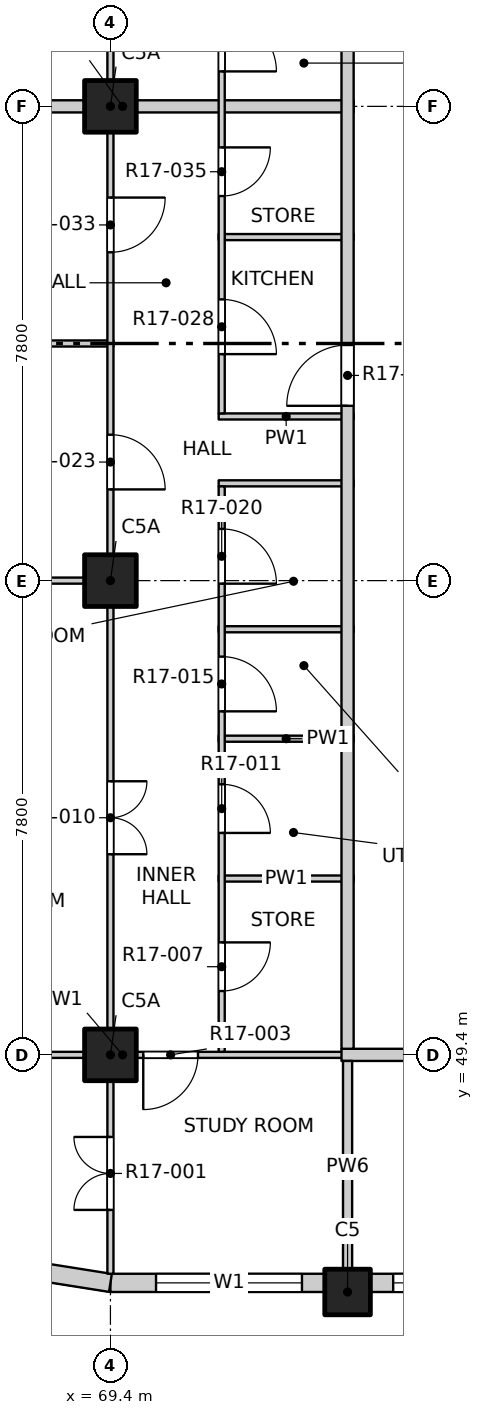
"""IFC4 building model, lengths in metres.
Left out: names, types, materials, properties, quantities, classifications, styles, units other than length and angle.
Written with IfcOpenShell. Run it as: python <this file> out.ifc"""

import sys

from ifc_helpers import new_model, si_unit, direction, frame, frame_2d, origin, origin_2d, place, context, subcontext, project, spatial, rectangle, extrude, element, fill, save


model = new_model("IFC4")
c1 = context("Model", 3, precision=1e-05, world=origin(), true_north=direction((0.0, 1.0)))
c2 = subcontext(c1, "Body", "Model", "MODEL_VIEW")
j1 = project(units=[si_unit("LENGTHUNIT", "METRE"), si_unit("PLANEANGLEUNIT", "RADIAN")], contexts=[c1])
p1 = place(None, origin())
s1 = spatial("IfcSite", under=j1, at=p1, CompositionType="ELEMENT")
p2 = place(p1, origin())
s2 = spatial("IfcBuilding", under=s1, at=p2, CompositionType="ELEMENT")
p3 = place(p2, frame((0.0, 0.0, 182.6)))
s3 = spatial("IfcBuildingStorey", under=s2, at=p3, CompositionType="ELEMENT", Elevation=182.6)
p4 = place(p3, frame((73.3, 45.5, -0.25), z_axis=(0.0, 0.0, 1.0), x_axis=(1.0, 0.0, 0.0)))
e1 = element("IfcColumn", 1, at=p4, inside=s3, PredefinedType="COLUMN", context=c2, shape_type="SweptSolid", body=[
    extrude(rectangle(XDim=0.75, YDim=0.75, at=origin_2d()), origin(), (0.0, 0.0, 1.0), 3.4),
])
for number, where, z_axis, x_axis in (
    (2, (69.4, 49.4, -0.25), (0.0, 0.0, 1.0), (1.0, 0.0, 0.0)),
    (3, (69.4, 57.2, -0.25), (0.0, 0.0, 1.0), (1.0, 0.0, 0.0)),
    (4, (69.4, 65.0, -0.25), (0.0, 0.0, 1.0), (1.0, 0.0, 0.0)),
):
    element("IfcColumn", number, at=place(p3, frame(where, z_axis=z_axis, x_axis=x_axis)), inside=s3, PredefinedType="COLUMN", context=c2, shape_type="SweptSolid", body=[
        extrude(rectangle(XDim=0.85, YDim=0.85, at=origin_2d()), origin(), (0.0, 0.0, 1.0), 3.4),
    ])
p5 = place(p3, frame((69.4, 45.65, 0.0), z_axis=(0.0, 0.0, 1.0), x_axis=(1.0, 0.0, 0.0)))
e5 = element("IfcWall", 5, at=p5, inside=s3, PredefinedType="SOLIDWALL", context=c2, shape_type="SweptSolid", body=[
    extrude(rectangle(XDim=3.525, YDim=0.3, at=frame_2d((1.763, 0.0))), origin(), (0.0, 0.0, 1.0), 2.7),
])
p6 = place(p5, frame((0.75, 0.0, 0.9)))
e6 = element("IfcOpeningElement", 6, at=p6, cuts=e5, PredefinedType="OPENING", context=c2, shape_type="SweptSolid", body=[
    extrude(rectangle(XDim=2.4, YDim=1.8, at=frame_2d((1.2, 0.9))), frame((0.0, 0.16, 0.0), z_axis=(0.0, -1.0, 0.0), x_axis=(1.0, 0.0, 0.0)), (0.0, 0.0, 1.0), 0.32),
])
p7 = place(p3, frame((73.675, 45.65, 0.0), z_axis=(0.0, 0.0, 1.0), x_axis=(1.0, 0.0, 0.0)))
e7 = element("IfcWall", 7, at=p7, inside=s3, PredefinedType="SOLIDWALL", context=c2, shape_type="SweptSolid", body=[
    extrude(rectangle(XDim=7.05, YDim=0.3, at=frame_2d((3.525, 0.0))), origin(), (0.0, 0.0, 1.0), 2.7),
])
p8 = place(p7, frame((0.375, 0.0, 0.9)))
e8 = element("IfcOpeningElement", 8, at=p8, cuts=e7, PredefinedType="OPENING", context=c2, shape_type="SweptSolid", body=[
    extrude(rectangle(XDim=2.4, YDim=1.8, at=frame_2d((1.2, 0.9))), frame((0.0, 0.16, 0.0), z_axis=(0.0, -1.0, 0.0), x_axis=(1.0, 0.0, 0.0)), (0.0, 0.0, 1.0), 0.32),
])
p9 = place(p7, frame((4.275, 0.0, 0.9)))
e9 = element("IfcOpeningElement", 9, at=p9, cuts=e7, PredefinedType="OPENING", context=c2, shape_type="SweptSolid", body=[
    extrude(rectangle(XDim=2.4, YDim=1.8, at=frame_2d((1.2, 0.9))), frame((0.0, 0.16, 0.0), z_axis=(0.0, -1.0, 0.0), x_axis=(1.0, 0.0, 0.0)), (0.0, 0.0, 1.0), 0.32),
])
p10 = place(p3, frame((68.241, 45.833, 0.0), z_axis=(0.0, 0.0, 1.0), x_axis=(0.987678452879, -0.156496880861, 0.0)))
e10 = element("IfcWall", 10, at=p10, inside=s3, PredefinedType="SOLIDWALL", context=c2, shape_type="SweptSolid", body=[
    extrude(rectangle(XDim=1.173, YDim=0.3, at=frame_2d((0.586, 0.0))), origin(), (0.0, 0.0, 1.0), 2.7),
])
p11 = place(p3, frame((65.8, 49.4, 0.0), z_axis=(0.0, 0.0, 1.0), x_axis=(1.0, 0.0, 0.0)))
e11 = element("IfcWall", 11, at=p11, inside=s3, PredefinedType="PARTITIONING", context=c2, shape_type="SweptSolid", body=[
    extrude(rectangle(XDim=7.6, YDim=0.1, at=frame_2d((3.8, 0.0))), origin(), (0.0, 0.0, 1.0), 3.15),
])
p12 = place(p11, frame((4.14, 0.0, 0.0)))
e12 = element("IfcOpeningElement", 12, at=p12, cuts=e11, PredefinedType="OPENING", context=c2, shape_type="SweptSolid", body=[
    extrude(rectangle(XDim=0.9, YDim=2.1, at=frame_2d((0.45, 1.05))), frame((0.0, 0.06, 0.0), z_axis=(0.0, -1.0, 0.0), x_axis=(1.0, 0.0, 0.0)), (0.0, 0.0, 1.0), 0.12),
])
p13 = place(p3, frame((73.2, 49.4, 0.0), z_axis=(0.0, 0.0, 1.0), x_axis=(1.0, 0.0, 0.0)))
e13 = element("IfcWall", 13, at=p13, inside=s3, PredefinedType="PARTITIONING", context=c2, shape_type="SweptSolid", body=[
    extrude(rectangle(XDim=23.6, YDim=0.2, at=frame_2d((11.8, 0.0))), origin(), (0.0, 0.0, 1.0), 3.15),
])
p14 = place(p13, frame((7.3, 0.0, 0.0)))
e14 = element("IfcOpeningElement", 14, at=p14, cuts=e13, PredefinedType="OPENING", context=c2, shape_type="SweptSolid", body=[
    extrude(rectangle(XDim=1.2, YDim=2.1, at=frame_2d((0.6, 1.05))), frame((0.0, 0.11, 0.0), z_axis=(0.0, -1.0, 0.0), x_axis=(1.0, 0.0, 0.0)), (0.0, 0.0, 1.0), 0.22),
])
p15 = place(p13, frame((20.125, 0.0, 0.0)))
e15 = element("IfcOpeningElement", 15, at=p15, cuts=e13, PredefinedType="OPENING", context=c2, shape_type="SweptSolid", body=[
    extrude(rectangle(XDim=1.2, YDim=2.1, at=frame_2d((0.6, 1.05))), frame((0.0, 0.11, 0.0), z_axis=(0.0, -1.0, 0.0), x_axis=(1.0, 0.0, 0.0)), (0.0, 0.0, 1.0), 0.22),
])
for number, where, z_axis, x_axis in (
    (16, (71.18, 52.3, 0.0), (0.0, 0.0, 1.0), (1.0, 0.0, 0.0)),
    (17, (71.18, 54.6, 0.0), (0.0, 0.0, 1.0), (1.0, 0.0, 0.0)),
    (18, (71.18, 56.4, 0.0), (0.0, 0.0, 1.0), (1.0, 0.0, 0.0)),
):
    element("IfcWall", number, at=place(p3, frame(where, z_axis=z_axis, x_axis=x_axis)), inside=s3, PredefinedType="PARTITIONING", context=c2, shape_type="SweptSolid", body=[
        extrude(rectangle(XDim=2.22, YDim=0.1, at=frame_2d((1.11, 0.0))), origin(), (0.0, 0.0, 1.0), 3.15),
    ])
p16 = place(p3, frame((65.8, 57.2, 0.0), z_axis=(0.0, 0.0, 1.0), x_axis=(1.0, 0.0, 0.0)))
e19 = element("IfcWall", 19, at=p16, inside=s3, PredefinedType="PARTITIONING", context=c2, shape_type="SweptSolid", body=[
    extrude(rectangle(XDim=3.65, YDim=0.1, at=frame_2d((1.825, 0.0))), origin(), (0.0, 0.0, 1.0), 3.15),
])
for number, where, z_axis, x_axis in (
    (20, (71.18, 58.8, 0.0), (0.0, 0.0, 1.0), (1.0, 0.0, 0.0)),
    (21, (71.18, 59.9, 0.0), (0.0, 0.0, 1.0), (1.0, 0.0, 0.0)),
):
    element("IfcWall", number, at=place(p3, frame(where, z_axis=z_axis, x_axis=x_axis)), inside=s3, PredefinedType="PARTITIONING", context=c2, shape_type="SweptSolid", body=[
        extrude(rectangle(XDim=2.22, YDim=0.1, at=frame_2d((1.11, 0.0))), origin(), (0.0, 0.0, 1.0), 3.15),
    ])
p17 = place(p3, frame((65.8, 61.1, 0.0), z_axis=(0.0, 0.0, 1.0), x_axis=(1.0, 0.0, 0.0)))
e22 = element("IfcWall", 22, at=p17, inside=s3, PredefinedType="PARTITIONING", context=c2, shape_type="SweptSolid", body=[
    extrude(rectangle(XDim=3.65, YDim=0.1, at=frame_2d((1.825, 0.0))), origin(), (0.0, 0.0, 1.0), 2.55),
])
p18 = place(p3, frame((71.18, 62.85, 0.0), z_axis=(0.0, 0.0, 1.0), x_axis=(1.0, 0.0, 0.0)))
e23 = element("IfcWall", 23, at=p18, inside=s3, PredefinedType="PARTITIONING", context=c2, shape_type="SweptSolid", body=[
    extrude(rectangle(XDim=2.22, YDim=0.1, at=frame_2d((1.11, 0.0))), origin(), (0.0, 0.0, 1.0), 3.15),
])
p19 = place(p3, frame((65.8, 65.0, 0.0), z_axis=(0.0, 0.0, 1.0), x_axis=(1.0, 0.0, 0.0)))
e24 = element("IfcWall", 24, at=p19, inside=s3, PredefinedType="PARTITIONING", context=c2, shape_type="SweptSolid", body=[
    extrude(rectangle(XDim=7.6, YDim=0.2, at=frame_2d((3.8, 0.0))), origin(), (0.0, 0.0, 1.0), 3.15),
])
p20 = place(p3, frame((69.4, 45.8, 0.0), z_axis=(0.0, 0.0, 1.0), x_axis=(0.0, 1.0, 0.0)))
e25 = element("IfcWall", 25, at=p20, inside=s3, PredefinedType="PARTITIONING", context=c2, shape_type="SweptSolid", body=[
    extrude(rectangle(XDim=38.4, YDim=0.1, at=frame_2d((19.2, 0.0))), origin(), (0.0, 0.0, 1.0), 3.15),
])
p21 = place(p20, frame((1.05, 0.0, 0.0)))
e26 = element("IfcOpeningElement", 26, at=p21, cuts=e25, PredefinedType="OPENING", context=c2, shape_type="SweptSolid", body=[
    extrude(rectangle(XDim=1.2, YDim=2.1, at=frame_2d((0.6, 1.05))), frame((0.0, 0.06, 0.0), z_axis=(0.0, -1.0, 0.0), x_axis=(1.0, 0.0, 0.0)), (0.0, 0.0, 1.0), 0.12),
])
p22 = place(p20, frame((6.9, 0.0, 0.0)))
e27 = element("IfcOpeningElement", 27, at=p22, cuts=e25, PredefinedType="OPENING", context=c2, shape_type="SweptSolid", body=[
    extrude(rectangle(XDim=1.2, YDim=2.1, at=frame_2d((0.6, 1.05))), frame((0.0, 0.06, 0.0), z_axis=(0.0, -1.0, 0.0), x_axis=(1.0, 0.0, 0.0)), (0.0, 0.0, 1.0), 0.12),
])
p23 = place(p20, frame((12.9, 0.0, 0.0)))
e28 = element("IfcOpeningElement", 28, at=p23, cuts=e25, PredefinedType="OPENING", context=c2, shape_type="SweptSolid", body=[
    extrude(rectangle(XDim=0.9, YDim=2.1, at=frame_2d((0.45, 1.05))), frame((0.0, 0.06, 0.0), z_axis=(0.0, -1.0, 0.0), x_axis=(1.0, 0.0, 0.0)), (0.0, 0.0, 1.0), 0.12),
])
p24 = place(p20, frame((16.8, 0.0, 0.0)))
e29 = element("IfcOpeningElement", 29, at=p24, cuts=e25, PredefinedType="OPENING", context=c2, shape_type="SweptSolid", body=[
    extrude(rectangle(XDim=0.9, YDim=2.1, at=frame_2d((0.45, 1.05))), frame((0.0, 0.06, 0.0), z_axis=(0.0, -1.0, 0.0), x_axis=(1.0, 0.0, 0.0)), (0.0, 0.0, 1.0), 0.12),
])
p25 = place(p20, frame((20.7, 0.0, 0.0)))
e30 = element("IfcOpeningElement", 30, at=p25, cuts=e25, PredefinedType="OPENING", context=c2, shape_type="SweptSolid", body=[
    extrude(rectangle(XDim=0.9, YDim=2.1, at=frame_2d((0.45, 1.05))), frame((0.0, 0.06, 0.0), z_axis=(0.0, -1.0, 0.0), x_axis=(1.0, 0.0, 0.0)), (0.0, 0.0, 1.0), 0.12),
])
p26 = place(p20, frame((24.6, 0.0, 0.0)))
e31 = element("IfcOpeningElement", 31, at=p26, cuts=e25, PredefinedType="OPENING", context=c2, shape_type="SweptSolid", body=[
    extrude(rectangle(XDim=0.9, YDim=2.1, at=frame_2d((0.45, 1.05))), frame((0.0, 0.06, 0.0), z_axis=(0.0, -1.0, 0.0), x_axis=(1.0, 0.0, 0.0)), (0.0, 0.0, 1.0), 0.12),
])
p27 = place(p20, frame((28.5, 0.0, 0.0)))
e32 = element("IfcOpeningElement", 32, at=p27, cuts=e25, PredefinedType="OPENING", context=c2, shape_type="SweptSolid", body=[
    extrude(rectangle(XDim=0.9, YDim=2.1, at=frame_2d((0.45, 1.05))), frame((0.0, 0.06, 0.0), z_axis=(0.0, -1.0, 0.0), x_axis=(1.0, 0.0, 0.0)), (0.0, 0.0, 1.0), 0.12),
])
p28 = place(p20, frame((32.4, 0.0, 0.0)))
e33 = element("IfcOpeningElement", 33, at=p28, cuts=e25, PredefinedType="OPENING", context=c2, shape_type="SweptSolid", body=[
    extrude(rectangle(XDim=0.9, YDim=2.1, at=frame_2d((0.45, 1.05))), frame((0.0, 0.06, 0.0), z_axis=(0.0, -1.0, 0.0), x_axis=(1.0, 0.0, 0.0)), (0.0, 0.0, 1.0), 0.12),
])
p29 = place(p20, frame((36.15, 0.0, 0.0)))
e34 = element("IfcOpeningElement", 34, at=p29, cuts=e25, PredefinedType="OPENING", context=c2, shape_type="SweptSolid", body=[
    extrude(rectangle(XDim=1.2, YDim=2.1, at=frame_2d((0.6, 1.05))), frame((0.0, 0.06, 0.0), z_axis=(0.0, -1.0, 0.0), x_axis=(1.0, 0.0, 0.0)), (0.0, 0.0, 1.0), 0.12),
])
p30 = place(p3, frame((71.23, 49.45, 0.0), z_axis=(0.0, 0.0, 1.0), x_axis=(0.0, 1.0, 0.0)))
e35 = element("IfcWall", 35, at=p30, inside=s3, PredefinedType="PARTITIONING", context=c2, shape_type="SweptSolid", body=[
    extrude(rectangle(XDim=9.3, YDim=0.1, at=frame_2d((4.65, 0.0))), origin(), (0.0, 0.0, 1.0), 3.15),
])
p31 = place(p30, frame((1.0, 0.0, 0.0)))
e36 = element("IfcOpeningElement", 36, at=p31, cuts=e35, PredefinedType="OPENING", context=c2, shape_type="SweptSolid", body=[
    extrude(rectangle(XDim=0.8, YDim=2.1, at=frame_2d((0.4, 1.05))), frame((0.0, 0.06, 0.0), z_axis=(0.0, -1.0, 0.0), x_axis=(1.0, 0.0, 0.0)), (0.0, 0.0, 1.0), 0.12),
])
p32 = place(p30, frame((3.6, 0.0, 0.0)))
e37 = element("IfcOpeningElement", 37, at=p32, cuts=e35, PredefinedType="OPENING", context=c2, shape_type="SweptSolid", body=[
    extrude(rectangle(XDim=0.8, YDim=2.1, at=frame_2d((0.4, 1.05))), frame((0.0, 0.06, 0.0), z_axis=(0.0, -1.0, 0.0), x_axis=(1.0, 0.0, 0.0)), (0.0, 0.0, 1.0), 0.12),
])
p33 = place(p30, frame((5.6, 0.0, 0.0)))
e38 = element("IfcOpeningElement", 38, at=p33, cuts=e35, PredefinedType="OPENING", context=c2, shape_type="SweptSolid", body=[
    extrude(rectangle(XDim=0.9, YDim=2.1, at=frame_2d((0.45, 1.05))), frame((0.0, 0.06, 0.0), z_axis=(0.0, -1.0, 0.0), x_axis=(1.0, 0.0, 0.0)), (0.0, 0.0, 1.0), 0.12),
])
p34 = place(p30, frame((7.7, 0.0, 0.0)))
e39 = element("IfcOpeningElement", 39, at=p34, cuts=e35, PredefinedType="OPENING", context=c2, shape_type="SweptSolid", body=[
    extrude(rectangle(XDim=0.9, YDim=2.1, at=frame_2d((0.45, 1.05))), frame((0.0, 0.06, 0.0), z_axis=(0.0, -1.0, 0.0), x_axis=(1.0, 0.0, 0.0)), (0.0, 0.0, 1.0), 0.12),
])
p35 = place(p3, frame((71.23, 59.95, 0.0), z_axis=(0.0, 0.0, 1.0), x_axis=(0.0, 1.0, 0.0)))
e40 = element("IfcWall", 40, at=p35, inside=s3, PredefinedType="PARTITIONING", context=c2, shape_type="SweptSolid", body=[
    extrude(rectangle(XDim=7.05, YDim=0.1, at=frame_2d((3.525, 0.0))), origin(), (0.0, 0.0, 1.0), 3.15),
])
p36 = place(p35, frame((0.975, 0.0, 0.0)))
e41 = element("IfcOpeningElement", 41, at=p36, cuts=e40, PredefinedType="OPENING", context=c2, shape_type="SweptSolid", body=[
    extrude(rectangle(XDim=0.9, YDim=2.1, at=frame_2d((0.45, 1.05))), frame((0.0, 0.06, 0.0), z_axis=(0.0, -1.0, 0.0), x_axis=(1.0, 0.0, 0.0)), (0.0, 0.0, 1.0), 0.12),
])
p37 = place(p35, frame((3.575, 0.0, 0.0)))
e42 = element("IfcOpeningElement", 42, at=p37, cuts=e40, PredefinedType="OPENING", context=c2, shape_type="SweptSolid", body=[
    extrude(rectangle(XDim=0.8, YDim=2.1, at=frame_2d((0.4, 1.05))), frame((0.0, 0.06, 0.0), z_axis=(0.0, -1.0, 0.0), x_axis=(1.0, 0.0, 0.0)), (0.0, 0.0, 1.0), 0.12),
])
p38 = place(p35, frame((5.625, 0.0, 0.0)))
e43 = element("IfcOpeningElement", 43, at=p38, cuts=e40, PredefinedType="OPENING", context=c2, shape_type="SweptSolid", body=[
    extrude(rectangle(XDim=0.9, YDim=2.1, at=frame_2d((0.45, 1.05))), frame((0.0, 0.06, 0.0), z_axis=(0.0, -1.0, 0.0), x_axis=(1.0, 0.0, 0.0)), (0.0, 0.0, 1.0), 0.12),
])
p39 = place(p3, frame((73.3, 45.8, 0.0), z_axis=(0.0, 0.0, 1.0), x_axis=(0.0, 1.0, 0.0)))
e44 = element("IfcWall", 44, at=p39, inside=s3, PredefinedType="PARTITIONING", context=c2, shape_type="SweptSolid", body=[
    extrude(rectangle(XDim=3.5, YDim=0.15, at=frame_2d((1.75, 0.0))), origin(), (0.0, 0.0, 1.0), 3.15),
])
p40 = place(p3, frame((73.3, 49.5, 0.0), z_axis=(0.0, 0.0, 1.0), x_axis=(0.0, 1.0, 0.0)))
e45 = element("IfcWall", 45, at=p40, inside=s3, PredefinedType="PARTITIONING", context=c2, shape_type="SweptSolid", body=[
    extrude(rectangle(XDim=34.7, YDim=0.2, at=frame_2d((17.35, 0.0))), origin(), (0.0, 0.0, 1.0), 3.15),
])
p41 = place(p40, frame((10.575, 0.0, 0.0)))
e46 = element("IfcOpeningElement", 46, at=p41, cuts=e45, PredefinedType="OPENING", context=c2, shape_type="SweptSolid", body=[
    extrude(rectangle(XDim=1.0, YDim=2.1, at=frame_2d((0.5, 1.05))), frame((0.0, 0.11, 0.0), z_axis=(0.0, -1.0, 0.0), x_axis=(1.0, 0.0, 0.0)), (0.0, 0.0, 1.0), 0.22),
])
p42 = place(p40, frame((18.825, 0.0, 0.0)))
e47 = element("IfcOpeningElement", 47, at=p42, cuts=e45, PredefinedType="OPENING", context=c2, shape_type="SweptSolid", body=[
    extrude(rectangle(XDim=1.0, YDim=2.1, at=frame_2d((0.5, 1.05))), frame((0.0, 0.11, 0.0), z_axis=(0.0, -1.0, 0.0), x_axis=(1.0, 0.0, 0.0)), (0.0, 0.0, 1.0), 0.22),
])
p43 = place(p40, frame((29.075, 0.0, 0.0)))
e48 = element("IfcOpeningElement", 48, at=p43, cuts=e45, PredefinedType="OPENING", context=c2, shape_type="SweptSolid", body=[
    extrude(rectangle(XDim=1.0, YDim=2.1, at=frame_2d((0.5, 1.05))), frame((0.0, 0.11, 0.0), z_axis=(0.0, -1.0, 0.0), x_axis=(1.0, 0.0, 0.0)), (0.0, 0.0, 1.0), 0.22),
])
p44 = place(p6, origin())
e49 = element("IfcWindow", 49, at=p44, inside=s3, PartitioningType="DOUBLE_PANEL_VERTICAL", PredefinedType="WINDOW", context=c2, shape_type="SweptSolid", body=[
    extrude(rectangle(XDim=2.4, YDim=1.8, at=frame_2d((1.2, 0.9))), frame((0.0, 0.03, 0.0), z_axis=(0.0, -1.0, 0.0), x_axis=(1.0, 0.0, 0.0)), (0.0, 0.0, 1.0), 0.06),
])
fill(e6, e49)
p45 = place(p8, origin())
e50 = element("IfcWindow", 50, at=p45, inside=s3, PartitioningType="DOUBLE_PANEL_VERTICAL", PredefinedType="WINDOW", context=c2, shape_type="SweptSolid", body=[
    extrude(rectangle(XDim=2.4, YDim=1.8, at=frame_2d((1.2, 0.9))), frame((0.0, 0.03, 0.0), z_axis=(0.0, -1.0, 0.0), x_axis=(1.0, 0.0, 0.0)), (0.0, 0.0, 1.0), 0.06),
])
fill(e8, e50)
p46 = place(p21, origin())
e51 = element("IfcDoor", 51, at=p46, inside=s3, OperationType="DOUBLE_DOOR_SINGLE_SWING", PredefinedType="DOOR", context=c2, shape_type="SweptSolid", body=[
    extrude(rectangle(XDim=1.2, YDim=2.1, at=frame_2d((0.6, 1.05))), frame((0.0, 0.025, 0.0), z_axis=(0.0, -1.0, 0.0), x_axis=(1.0, 0.0, 0.0)), (0.0, 0.0, 1.0), 0.05),
])
fill(e26, e51)
p47 = place(p12, origin())
e52 = element("IfcDoor", 52, at=p47, inside=s3, OperationType="SINGLE_SWING_RIGHT", PredefinedType="DOOR", context=c2, shape_type="SweptSolid", body=[
    extrude(rectangle(XDim=0.9, YDim=2.1, at=frame_2d((0.45, 1.05))), frame((0.0, 0.025, 0.0), z_axis=(0.0, -1.0, 0.0), x_axis=(1.0, 0.0, 0.0)), (0.0, 0.0, 1.0), 0.05),
])
fill(e12, e52)
p48 = place(p31, origin())
e53 = element("IfcDoor", 53, at=p48, inside=s3, OperationType="SINGLE_SWING_LEFT", PredefinedType="DOOR", context=c2, shape_type="SweptSolid", body=[
    extrude(rectangle(XDim=0.8, YDim=2.1, at=frame_2d((0.4, 1.05))), frame((0.0, 0.025, 0.0), z_axis=(0.0, -1.0, 0.0), x_axis=(1.0, 0.0, 0.0)), (0.0, 0.0, 1.0), 0.05),
])
fill(e36, e53)
p49 = place(p22, origin())
e54 = element("IfcDoor", 54, at=p49, inside=s3, OperationType="DOUBLE_DOOR_SINGLE_SWING", PredefinedType="DOOR", context=c2, shape_type="SweptSolid", body=[
    extrude(rectangle(XDim=1.2, YDim=2.1, at=frame_2d((0.6, 1.05))), frame((0.0, 0.025, 0.0), z_axis=(0.0, -1.0, 0.0), x_axis=(1.0, 0.0, 0.0)), (0.0, 0.0, 1.0), 0.05),
])
fill(e27, e54)
p50 = place(p32, origin())
e55 = element("IfcDoor", 55, at=p50, inside=s3, OperationType="SINGLE_SWING_RIGHT", PredefinedType="DOOR", context=c2, shape_type="SweptSolid", body=[
    extrude(rectangle(XDim=0.8, YDim=2.1, at=frame_2d((0.4, 1.05))), frame((0.0, 0.025, 0.0), z_axis=(0.0, -1.0, 0.0), x_axis=(1.0, 0.0, 0.0)), (0.0, 0.0, 1.0), 0.05),
])
fill(e37, e55)
p51 = place(p33, origin())
e56 = element("IfcDoor", 56, at=p51, inside=s3, OperationType="SINGLE_SWING_RIGHT", PredefinedType="DOOR", context=c2, shape_type="SweptSolid", body=[
    extrude(rectangle(XDim=0.9, YDim=2.1, at=frame_2d((0.45, 1.05))), frame((0.0, 0.025, 0.0), z_axis=(0.0, -1.0, 0.0), x_axis=(1.0, 0.0, 0.0)), (0.0, 0.0, 1.0), 0.05),
])
fill(e38, e56)
p52 = place(p34, origin())
e57 = element("IfcDoor", 57, at=p52, inside=s3, OperationType="SINGLE_SWING_RIGHT", PredefinedType="DOOR", context=c2, shape_type="SweptSolid", body=[
    extrude(rectangle(XDim=0.9, YDim=2.1, at=frame_2d((0.45, 1.05))), frame((0.0, 0.025, 0.0), z_axis=(0.0, -1.0, 0.0), x_axis=(1.0, 0.0, 0.0)), (0.0, 0.0, 1.0), 0.05),
])
fill(e39, e57)
p53 = place(p23, origin())
e58 = element("IfcDoor", 58, at=p53, inside=s3, OperationType="SINGLE_SWING_RIGHT", PredefinedType="DOOR", context=c2, shape_type="SweptSolid", body=[
    extrude(rectangle(XDim=0.9, YDim=2.1, at=frame_2d((0.45, 1.05))), frame((0.0, 0.025, 0.0), z_axis=(0.0, -1.0, 0.0), x_axis=(1.0, 0.0, 0.0)), (0.0, 0.0, 1.0), 0.05),
])
fill(e28, e58)
p54 = place(p41, origin())
e59 = element("IfcDoor", 59, at=p54, inside=s3, OperationType="SINGLE_SWING_RIGHT", PredefinedType="DOOR", context=c2, shape_type="SweptSolid", body=[
    extrude(rectangle(XDim=1.0, YDim=2.1, at=frame_2d((0.5, 1.05))), frame((0.0, 0.025, 0.0), z_axis=(0.0, -1.0, 0.0), x_axis=(1.0, 0.0, 0.0)), (0.0, 0.0, 1.0), 0.05),
])
fill(e46, e59)
p55 = place(p36, origin())
e60 = element("IfcDoor", 60, at=p55, inside=s3, OperationType="SINGLE_SWING_RIGHT", PredefinedType="DOOR", context=c2, shape_type="SweptSolid", body=[
    extrude(rectangle(XDim=0.9, YDim=2.1, at=frame_2d((0.45, 1.05))), frame((0.0, 0.025, 0.0), z_axis=(0.0, -1.0, 0.0), x_axis=(1.0, 0.0, 0.0)), (0.0, 0.0, 1.0), 0.05),
])
fill(e41, e60)
p56 = place(p24, origin())
e61 = element("IfcDoor", 61, at=p56, inside=s3, OperationType="SINGLE_SWING_LEFT", PredefinedType="DOOR", context=c2, shape_type="SweptSolid", body=[
    extrude(rectangle(XDim=0.9, YDim=2.1, at=frame_2d((0.45, 1.05))), frame((0.0, 0.025, 0.0), z_axis=(0.0, -1.0, 0.0), x_axis=(1.0, 0.0, 0.0)), (0.0, 0.0, 1.0), 0.05),
])
fill(e29, e61)
p57 = place(p37, origin())
e62 = element("IfcDoor", 62, at=p57, inside=s3, OperationType="SINGLE_SWING_LEFT", PredefinedType="DOOR", context=c2, shape_type="SweptSolid", body=[
    extrude(rectangle(XDim=0.8, YDim=2.1, at=frame_2d((0.4, 1.05))), frame((0.0, 0.025, 0.0), z_axis=(0.0, -1.0, 0.0), x_axis=(1.0, 0.0, 0.0)), (0.0, 0.0, 1.0), 0.05),
])
fill(e42, e62)
p58 = place(p38, origin())
e63 = element("IfcDoor", 63, at=p58, inside=s3, OperationType="SINGLE_SWING_RIGHT", PredefinedType="DOOR", context=c2, shape_type="SweptSolid", body=[
    extrude(rectangle(XDim=0.9, YDim=2.1, at=frame_2d((0.45, 1.05))), frame((0.0, 0.025, 0.0), z_axis=(0.0, -1.0, 0.0), x_axis=(1.0, 0.0, 0.0)), (0.0, 0.0, 1.0), 0.05),
])
fill(e43, e63)
save(model, sys.argv[1])
